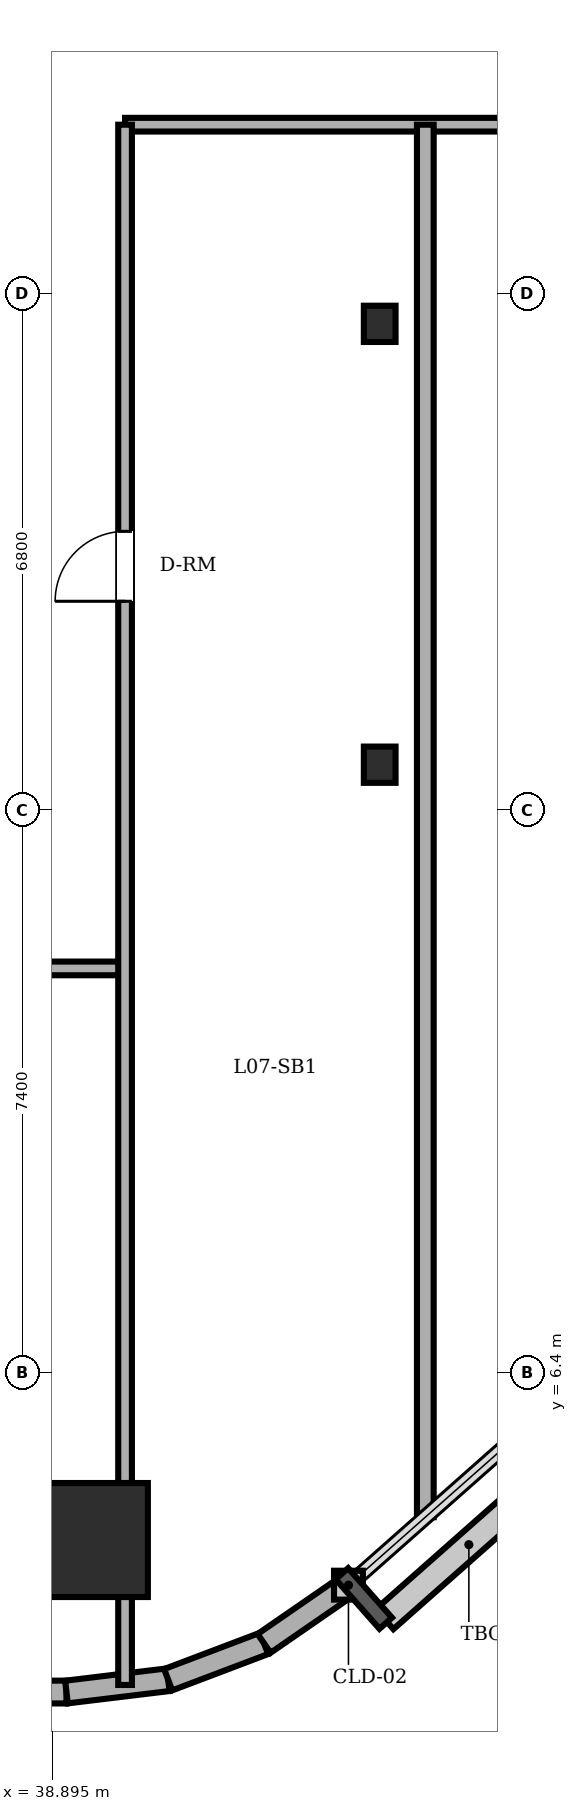
"""IFC4 building model, lengths in metres.
Left out: names, types, materials, properties, quantities, classifications, styles, units other than length and angle.
Written with IfcOpenShell. Run it as: python <this file> out.ifc"""

import sys

from ifc_helpers import new_model, si_unit, direction, frame, frame_2d, origin, origin_2d, place, context, subcontext, project, spatial, rectangle, circle, i_section, extrude, element, fill, save


model = new_model("IFC4")
c1 = context("Model", 3, precision=1e-05, world=origin(), true_north=direction((0.0, 1.0)))
c2 = subcontext(c1, "Body", "Model", "MODEL_VIEW")
j1 = project(units=[si_unit("LENGTHUNIT", "METRE"), si_unit("PLANEANGLEUNIT", "RADIAN")], contexts=[c1])
p1 = place(None, origin())
s1 = spatial("IfcSite", under=j1, at=p1, CompositionType="ELEMENT")
p2 = place(p1, origin())
s2 = spatial("IfcBuilding", under=s1, at=p2, CompositionType="ELEMENT")
p3 = place(p2, frame((0.0, 0.0, 28.8)))
s3 = spatial("IfcBuildingStorey", under=s2, at=p3, CompositionType="ELEMENT", Elevation=28.8)
p4 = place(p3, frame((39.4, 4.2, 0.0), z_axis=(0.0, 0.0, 1.0), x_axis=(1.0, 0.0, 0.0)))
e1 = element("IfcColumn", 1, at=p4, inside=s3, PredefinedType="COLUMN", context=c2, shape_type="SweptSolid", body=[
    extrude(circle(Radius=0.75, at=origin_2d()), origin(), (0.0, 0.0, 1.0), 3.6),
])
for number, where, z_axis, x_axis in (
    (2, (43.2, 14.4, 0.0), (0.0, 0.0, 1.0), (1.0, 0.0, 0.0)),
    (3, (43.2, 20.2, 0.0), (0.0, 0.0, 1.0), (1.0, 0.0, 0.0)),
):
    element("IfcColumn", number, at=place(p3, frame(where, z_axis=z_axis, x_axis=x_axis)), inside=s3, PredefinedType="COLUMN", context=c2, shape_type="SweptSolid", body=[
        extrude(i_section(OverallWidth=0.417, OverallDepth=0.477, WebThickness=0.036, FlangeThickness=0.057, FilletRadius=0.015, at=origin_2d()), origin(), (0.0, 0.0, 1.0), 3.6),
    ])
p5 = place(p3, frame((9.0, 2.2, 0.0), z_axis=(0.0, 0.0, 1.0), x_axis=(1.0, 0.0, 0.0)))
e4 = element("IfcWall", 4, at=p5, inside=s3, PredefinedType="SOLIDWALL", context=c2, shape_type="SweptSolid", body=[
    extrude(rectangle(XDim=30.079, YDim=0.3, at=frame_2d((15.04, 0.0))), origin(), (0.0, 0.0, 1.0), 3.4),
])
p6 = place(p5, frame((6.975, 0.0, 0.0)))
e5 = element("IfcOpeningElement", 5, at=p6, cuts=e4, PredefinedType="OPENING", context=c2, shape_type="SweptSolid", body=[
    extrude(rectangle(XDim=0.95, YDim=2.2, at=frame_2d((0.475, 1.1))), frame((0.0, 0.16, 0.0), z_axis=(0.0, -1.0, 0.0), x_axis=(1.0, 0.0, 0.0)), (0.0, 0.0, 1.0), 0.32),
])
p7 = place(p5, frame((9.45, 0.0, 0.85)))
e6 = element("IfcOpeningElement", 6, at=p7, cuts=e4, PredefinedType="OPENING", context=c2, shape_type="SweptSolid", body=[
    extrude(rectangle(XDim=1.8, YDim=1.55, at=frame_2d((0.9, 0.775))), frame((0.0, 0.16, 0.0), z_axis=(0.0, -1.0, 0.0), x_axis=(1.0, 0.0, 0.0)), (0.0, 0.0, 1.0), 0.32),
])
p8 = place(p5, frame((15.2, 0.0, 0.85)))
e7 = element("IfcOpeningElement", 7, at=p8, cuts=e4, PredefinedType="OPENING", context=c2, shape_type="SweptSolid", body=[
    extrude(rectangle(XDim=1.8, YDim=1.55, at=frame_2d((0.9, 0.775))), frame((0.0, 0.16, 0.0), z_axis=(0.0, -1.0, 0.0), x_axis=(1.0, 0.0, 0.0)), (0.0, 0.0, 1.0), 0.32),
])
p9 = place(p5, frame((21.01, 0.0, 0.85)))
e8 = element("IfcOpeningElement", 8, at=p9, cuts=e4, PredefinedType="OPENING", context=c2, shape_type="SweptSolid", body=[
    extrude(rectangle(XDim=1.8, YDim=1.55, at=frame_2d((0.9, 0.775))), frame((0.0, 0.16, 0.0), z_axis=(0.0, -1.0, 0.0), x_axis=(1.0, 0.0, 0.0)), (0.0, 0.0, 1.0), 0.32),
])
p10 = place(p5, frame((24.919, 0.0, 0.85)))
e9 = element("IfcOpeningElement", 9, at=p10, cuts=e4, PredefinedType="OPENING", context=c2, shape_type="SweptSolid", body=[
    extrude(rectangle(XDim=1.8, YDim=1.55, at=frame_2d((0.9, 0.775))), frame((0.0, 0.16, 0.0), z_axis=(0.0, -1.0, 0.0), x_axis=(1.0, 0.0, 0.0)), (0.0, 0.0, 1.0), 0.32),
])
p11 = place(p3, frame((39.079, 2.2, 0.0), z_axis=(0.0, 0.0, 1.0), x_axis=(0.992739027259, 0.120288086515, 0.0)))
e10 = element("IfcWall", 10, at=p11, inside=s3, PredefinedType="SOLIDWALL", context=c2, shape_type="SweptSolid", body=[
    extrude(rectangle(XDim=1.348, YDim=0.3, at=frame_2d((0.674, 0.0))), origin(), (0.0, 0.0, 1.0), 3.4),
])
p12 = place(p3, frame((40.417, 2.362, 0.0), z_axis=(0.0, 0.0, 1.0), x_axis=(0.935156721165, 0.354234254216, 0.0)))
e11 = element("IfcWall", 11, at=p12, inside=s3, PredefinedType="SOLIDWALL", context=c2, shape_type="SweptSolid", body=[
    extrude(rectangle(XDim=1.349, YDim=0.3, at=frame_2d((0.675, 0.0))), origin(), (0.0, 0.0, 1.0), 3.4),
])
p13 = place(p3, frame((41.679, 2.84, 0.0), z_axis=(0.0, 0.0, 1.0), x_axis=(0.823116500192, 0.567872544777, 0.0)))
e12 = element("IfcWall", 12, at=p13, inside=s3, PredefinedType="SOLIDWALL", context=c2, shape_type="SweptSolid", body=[
    extrude(rectangle(XDim=1.349, YDim=0.3, at=frame_2d((0.674, 0.0))), origin(), (0.0, 0.0, 1.0), 3.4),
])
p14 = place(p3, frame((3.4, 11.72, 0.0), z_axis=(0.0, 0.0, 1.0), x_axis=(1.0, 0.0, 0.0)))
e13 = element("IfcWall", 13, at=p14, inside=s3, PredefinedType="PARTITIONING", context=c2, shape_type="SweptSolid", body=[
    extrude(rectangle(XDim=36.45, YDim=0.18, at=frame_2d((18.225, 0.0))), origin(), (0.0, 0.0, 1.0), 3.4),
])
p15 = place(p14, frame((21.24, 0.0, 0.0)))
e14 = element("IfcOpeningElement", 14, at=p15, cuts=e13, PredefinedType="OPENING", context=c2, shape_type="SweptSolid", body=[
    extrude(rectangle(XDim=0.92, YDim=2.1, at=frame_2d((0.46, 1.05))), frame((0.0, 0.1, 0.0), z_axis=(0.0, -1.0, 0.0), x_axis=(1.0, 0.0, 0.0)), (0.0, 0.0, 1.0), 0.2),
])
p16 = place(p14, frame((4.925, 0.0, 0.0)))
e15 = element("IfcOpeningElement", 15, at=p16, cuts=e13, PredefinedType="OPENING", context=c2, shape_type="SweptSolid", body=[
    extrude(rectangle(XDim=1.0, YDim=2.15, at=frame_2d((0.5, 1.075))), frame((0.0, 0.1, 0.0), z_axis=(0.0, -1.0, 0.0), x_axis=(1.0, 0.0, 0.0)), (0.0, 0.0, 1.0), 0.2),
])
p17 = place(p14, frame((13.525, 0.0, 0.0)))
e16 = element("IfcOpeningElement", 16, at=p17, cuts=e13, PredefinedType="OPENING", context=c2, shape_type="SweptSolid", body=[
    extrude(rectangle(XDim=1.0, YDim=2.15, at=frame_2d((0.5, 1.075))), frame((0.0, 0.1, 0.0), z_axis=(0.0, -1.0, 0.0), x_axis=(1.0, 0.0, 0.0)), (0.0, 0.0, 1.0), 0.2),
])
p18 = place(p14, frame((29.305, 0.0, 0.0)))
e17 = element("IfcOpeningElement", 17, at=p18, cuts=e13, PredefinedType="OPENING", context=c2, shape_type="SweptSolid", body=[
    extrude(rectangle(XDim=0.92, YDim=2.1, at=frame_2d((0.46, 1.05))), frame((0.0, 0.1, 0.0), z_axis=(0.0, -1.0, 0.0), x_axis=(1.0, 0.0, 0.0)), (0.0, 0.0, 1.0), 0.2),
])
p19 = place(p3, frame((39.85, 22.82, 0.0), z_axis=(0.0, 0.0, 1.0), x_axis=(1.0, 0.0, 0.0)))
e18 = element("IfcWall", 18, at=p19, inside=s3, PredefinedType="PARTITIONING", context=c2, shape_type="SweptSolid", body=[
    extrude(rectangle(XDim=11.75, YDim=0.18, at=frame_2d((5.875, 0.0))), origin(), (0.0, 0.0, 1.0), 3.4),
])
p20 = place(p19, frame((4.99, 0.0, 0.0)))
e19 = element("IfcOpeningElement", 19, at=p20, cuts=e18, PredefinedType="OPENING", context=c2, shape_type="SweptSolid", body=[
    extrude(rectangle(XDim=0.92, YDim=2.1, at=frame_2d((0.46, 1.05))), frame((0.0, 0.1, 0.0), z_axis=(0.0, -1.0, 0.0), x_axis=(1.0, 0.0, 0.0)), (0.0, 0.0, 1.0), 0.2),
])
p21 = place(p3, frame((39.85, 2.293, 0.0), z_axis=(0.0, 0.0, 1.0), x_axis=(0.0, 1.0, 0.0)))
e20 = element("IfcWall", 20, at=p21, inside=s3, PredefinedType="PARTITIONING", context=c2, shape_type="SweptSolid", body=[
    extrude(rectangle(XDim=20.527, YDim=0.18, at=frame_2d((10.264, 0.0))), origin(), (0.0, 0.0, 1.0), 2.782),
])
p22 = place(p21, frame((14.257, 0.0, 0.0)))
e21 = element("IfcOpeningElement", 21, at=p22, cuts=e20, PredefinedType="OPENING", context=c2, shape_type="SweptSolid", body=[
    extrude(rectangle(XDim=0.92, YDim=2.1, at=frame_2d((0.46, 1.05))), frame((0.0, 0.1, 0.0), z_axis=(0.0, -1.0, 0.0), x_axis=(1.0, 0.0, 0.0)), (0.0, 0.0, 1.0), 0.2),
])
p23 = place(p3, frame((43.8, 4.5, 0.0), z_axis=(0.0, 0.0, 1.0), x_axis=(0.0, 1.0, 0.0)))
e22 = element("IfcWall", 22, at=p23, inside=s3, PredefinedType="PARTITIONING", context=c2, shape_type="SweptSolid", body=[
    extrude(rectangle(XDim=18.32, YDim=0.22, at=frame_2d((9.16, 0.0))), origin(), (0.0, 0.0, 1.0), 3.4),
])
p24 = place(p22, origin())
e23 = element("IfcDoor", 23, at=p24, inside=s3, OperationType="SINGLE_SWING_LEFT", PredefinedType="DOOR", context=c2, shape_type="SweptSolid", body=[
    extrude(rectangle(XDim=0.92, YDim=2.1, at=frame_2d((0.46, 1.05))), frame((0.0, 0.025, 0.0), z_axis=(0.0, -1.0, 0.0), x_axis=(1.0, 0.0, 0.0)), (0.0, 0.0, 1.0), 0.05),
])
fill(e21, e23)
save(model, sys.argv[1])
